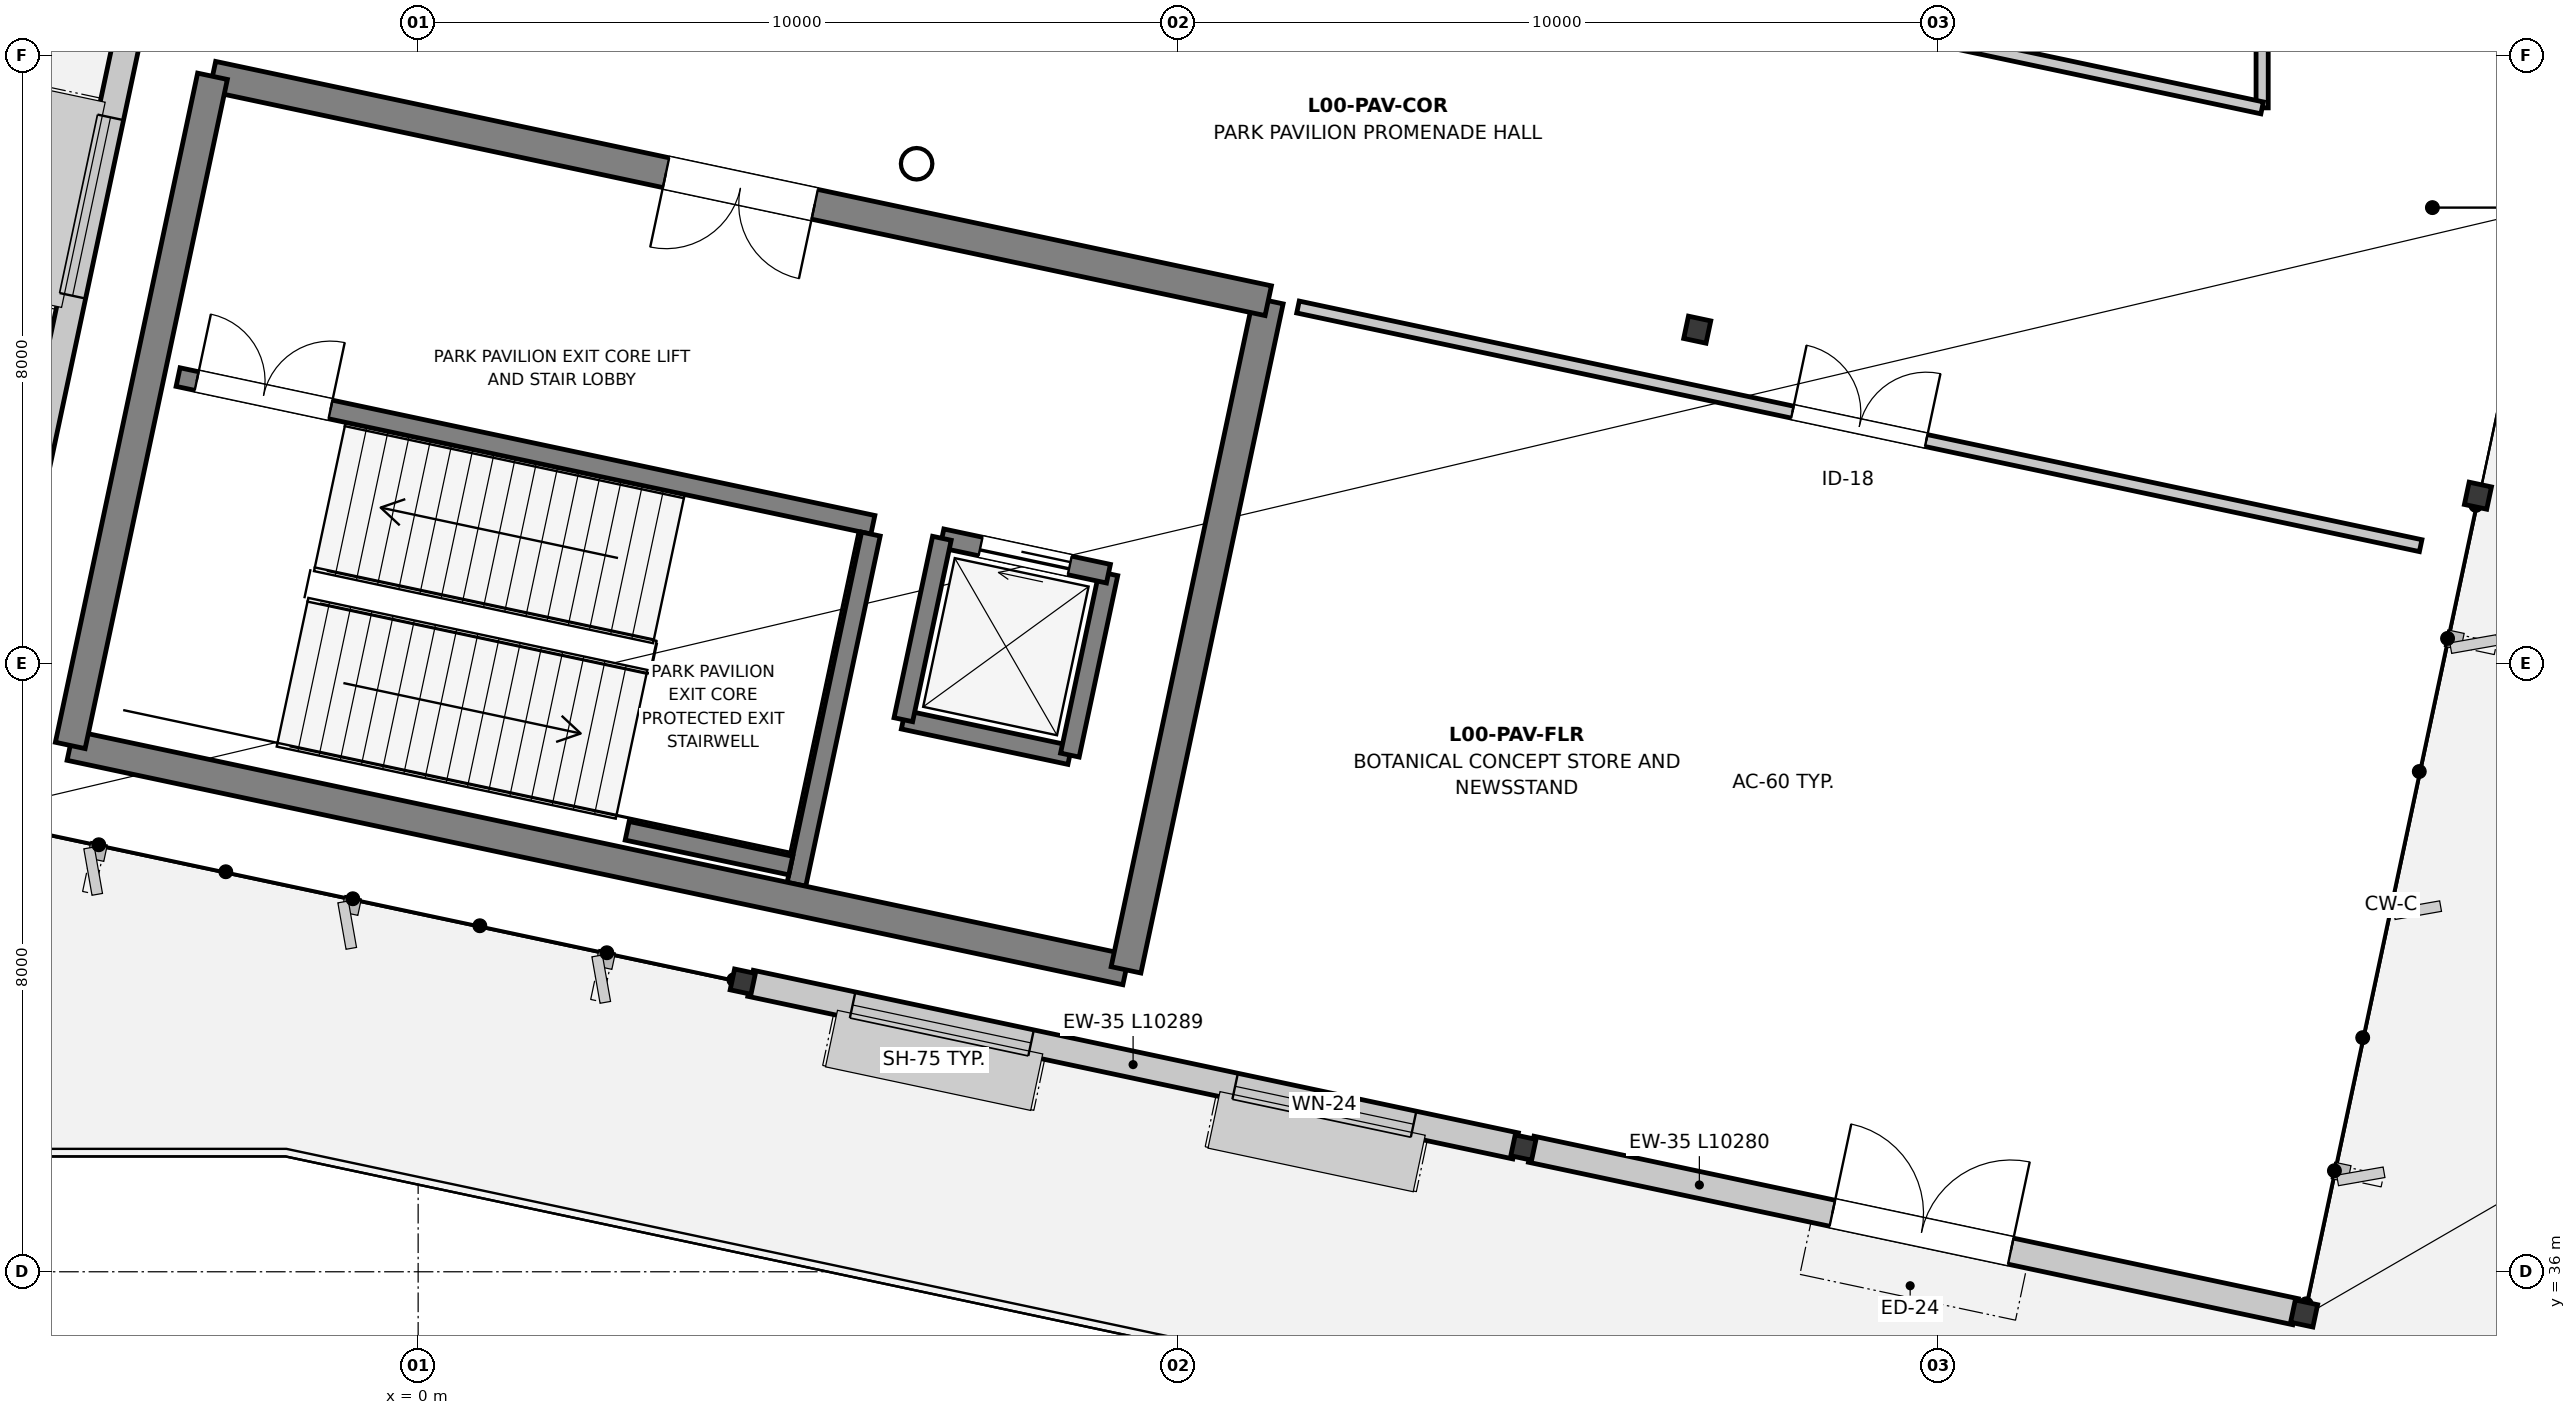
"""IFC4 building model, lengths in metres.
Left out: names, types, materials, properties, quantities, classifications, styles, units other than length and angle.
Written with IfcOpenShell. Run it as: python <this file> out.ifc"""

import sys

from ifc_helpers import new_model, si_unit, direction, frame, frame_2d, origin, origin_2d, place, context, subcontext, project, spatial, rectangle, hollow_rectangle, hollow_circle, i_section, extrude, element, fill, save


model = new_model("IFC4")
c1 = context("Model", 3, precision=1e-05, world=origin(), true_north=direction((0.0, 1.0)))
c2 = subcontext(c1, "Body", "Model", "MODEL_VIEW")
j1 = project(units=[si_unit("LENGTHUNIT", "METRE"), si_unit("PLANEANGLEUNIT", "RADIAN")], contexts=[c1])
p1 = place(None, origin())
s1 = spatial("IfcSite", under=j1, at=p1, CompositionType="ELEMENT")
p2 = place(p1, origin())
s2 = spatial("IfcBuilding", under=s1, at=p2, CompositionType="ELEMENT")
p3 = place(p2, origin())
s3 = spatial("IfcBuildingStorey", under=s2, at=p3, CompositionType="ELEMENT", Elevation=0.0)
p4 = place(p3, frame((4.271, 39.817, 0.0), z_axis=(0.0, 0.0, 1.0), x_axis=(0.978147600734, -0.207911690818, 0.0)))
e1 = element("IfcColumn", 1, at=p4, inside=s3, PredefinedType="COLUMN", context=c2, shape_type="SweptSolid", body=[
    extrude(i_section(OverallWidth=0.28, OverallDepth=0.28, WebThickness=0.011, FlangeThickness=0.018, FilletRadius=0.024, at=origin_2d()), origin(), (0.0, 0.0, 1.0), 6.0),
])
p5 = place(p3, frame((6.558, 50.577, 0.0), z_axis=(0.0, 0.0, 1.0), x_axis=(0.978147600734, -0.207911690818, 0.0)))
e2 = element("IfcColumn", 2, at=p5, inside=s3, PredefinedType="COLUMN", context=c2, shape_type="SweptSolid", body=[
    extrude(hollow_circle(Radius=0.203, WallThickness=0.016, at=origin_2d()), origin(), (0.0, 0.0, 1.0), 6.0),
])
p6 = place(p3, frame((14.541, 37.634, 0.0), z_axis=(0.0, 0.0, 1.0), x_axis=(0.978147600734, -0.207911690818, 0.0)))
e3 = element("IfcColumn", 3, at=p6, inside=s3, PredefinedType="COLUMN", context=c2, shape_type="SweptSolid", body=[
    extrude(i_section(OverallWidth=0.28, OverallDepth=0.28, WebThickness=0.011, FlangeThickness=0.018, FilletRadius=0.024, at=origin_2d()), origin(), (0.0, 0.0, 1.0), 6.0),
])
p7 = place(p3, frame((16.828, 48.394, 0.0), z_axis=(0.0, 0.0, 1.0), x_axis=(0.978147600734, -0.207911690818, 0.0)))
e4 = element("IfcColumn", 4, at=p7, inside=s3, PredefinedType="COLUMN", context=c2, shape_type="SweptSolid", body=[
    extrude(hollow_rectangle(XDim=0.3, YDim=0.3, WallThickness=0.016, InnerFilletRadius=0.016, OuterFilletRadius=0.032, at=origin_2d()), origin(), (0.0, 0.0, 1.0), 6.0),
])
for number, where, z_axis, x_axis in (
    (5, (24.812, 35.451, 0.0), (0.0, 0.0, 1.0), (0.978, -0.208, 0.0)),
    (6, (27.099, 46.21, 0.0), (0.0, 0.0, 1.0), (0.978, -0.208, 0.0)),
):
    element("IfcColumn", number, at=place(p3, frame(where, z_axis=z_axis, x_axis=x_axis)), inside=s3, PredefinedType="COLUMN", context=c2, shape_type="SweptSolid", body=[
        extrude(i_section(OverallWidth=0.3, OverallDepth=0.3, WebThickness=0.011, FlangeThickness=0.019, FilletRadius=0.027, at=origin_2d()), origin(), (0.0, 0.0, 1.0), 6.0),
    ])
p8 = place(p3, frame((4.374, 39.795, 0.0), z_axis=(0.0, 0.0, 1.0), x_axis=(0.978149513342, -0.207902692501, 0.0)))
e7 = element("IfcWall", 7, at=p8, inside=s3, PredefinedType="STANDARD", context=c2, shape_type="SweptSolid", body=[
    extrude(rectangle(XDim=10.289, YDim=0.35, at=frame_2d((5.145, 0.0))), origin(), (0.0, 0.0, 1.0), 5.015),
])
p9 = place(p8, frame((1.372, 0.0, 0.85)))
e8 = element("IfcOpeningElement", 8, at=p9, cuts=e7, PredefinedType="OPENING", context=c2, shape_type="SweptSolid", body=[
    extrude(rectangle(XDim=2.4, YDim=1.8, at=frame_2d((1.2, 0.9))), frame((0.0, 0.185, 0.0), z_axis=(0.0, -1.0, 0.0), x_axis=(1.0, 0.0, 0.0)), (0.0, 0.0, 1.0), 0.37),
])
p10 = place(p8, frame((6.517, 0.0, 0.85)))
e9 = element("IfcOpeningElement", 9, at=p10, cuts=e7, PredefinedType="OPENING", context=c2, shape_type="SweptSolid", body=[
    extrude(rectangle(XDim=2.4, YDim=1.8, at=frame_2d((1.2, 0.9))), frame((0.0, 0.185, 0.0), z_axis=(0.0, -1.0, 0.0), x_axis=(1.0, 0.0, 0.0)), (0.0, 0.0, 1.0), 0.37),
])
p11 = place(p3, frame((14.644, 37.612, 0.0), z_axis=(0.0, 0.0, 1.0), x_axis=(0.978146142238, -0.207918552381, 0.0)))
e10 = element("IfcWall", 10, at=p11, inside=s3, PredefinedType="STANDARD", context=c2, shape_type="SweptSolid", body=[
    extrude(rectangle(XDim=10.28, YDim=0.35, at=frame_2d((5.14, 0.0))), origin(), (0.0, 0.0, 1.0), 4.975),
])
p12 = place(p11, frame((4.05, 0.0, 0.0)))
e11 = element("IfcOpeningElement", 11, at=p12, cuts=e10, PredefinedType="OPENING", context=c2, shape_type="SweptSolid", body=[
    extrude(rectangle(XDim=2.4, YDim=2.5, at=frame_2d((1.2, 1.25))), frame((0.0, 0.185, 0.0), z_axis=(0.0, -1.0, 0.0), x_axis=(1.0, 0.0, 0.0)), (0.0, 0.0, 1.0), 0.37),
])
p13 = place(p3, frame((-3.737, 52.648, 0.0), z_axis=(0.0, 0.0, 1.0), x_axis=(-0.207913167485, -0.978147286857, 0.0)))
e12 = element("IfcWall", 12, at=p13, inside=s3, PredefinedType="STANDARD", context=c2, shape_type="SweptSolid", body=[
    extrude(rectangle(XDim=10.77, YDim=0.35, at=frame_2d((5.385, 0.0))), origin(), (0.0, 0.0, 1.0), 5.025),
])
p14 = place(p13, frame((1.493, 0.0, 0.85)))
e13 = element("IfcOpeningElement", 13, at=p14, cuts=e12, PredefinedType="OPENING", context=c2, shape_type="SweptSolid", body=[
    extrude(rectangle(XDim=2.4, YDim=1.8, at=frame_2d((1.2, 0.9))), frame((0.0, 0.185, 0.0), z_axis=(0.0, -1.0, 0.0), x_axis=(1.0, 0.0, 0.0)), (0.0, 0.0, 1.0), 0.37),
])
p15 = place(p13, frame((6.878, 0.0, 0.85)))
e14 = element("IfcOpeningElement", 14, at=p15, cuts=e12, PredefinedType="OPENING", context=c2, shape_type="SweptSolid", body=[
    extrude(rectangle(XDim=2.4, YDim=1.8, at=frame_2d((1.2, 0.9))), frame((0.0, 0.185, 0.0), z_axis=(0.0, -1.0, 0.0), x_axis=(1.0, 0.0, 0.0)), (0.0, 0.0, 1.0), 0.37),
])
p16 = place(p3, frame((6.383, 43.263, 0.0), z_axis=(0.0, 0.0, 1.0), x_axis=(0.978150567781, -0.207897731466, 0.0)))
e15 = element("IfcWall", 15, at=p16, inside=s3, PredefinedType="SOLIDWALL", context=c2, shape_type="SweptSolid", body=[
    extrude(rectangle(XDim=2.24, YDim=0.25, at=frame_2d((1.12, 0.0))), origin(), (0.0, 0.0, 1.0), 5.64),
])
p17 = place(p3, frame((8.574, 42.797, 0.0), z_axis=(0.0, 0.0, 1.0), x_axis=(0.207908261464, 0.978148329659, 0.0)))
e16 = element("IfcWall", 16, at=p17, inside=s3, PredefinedType="SOLIDWALL", context=c2, shape_type="SweptSolid", body=[
    extrude(rectangle(XDim=2.44, YDim=0.25, at=frame_2d((1.22, 0.0))), origin(), (0.0, 0.0, 1.0), 5.64),
])
p18 = place(p3, frame((9.082, 45.184, 0.0), z_axis=(0.0, 0.0, 1.0), x_axis=(-0.978150567781, 0.207897731466, 0.0)))
e17 = element("IfcWall", 17, at=p18, inside=s3, PredefinedType="SOLIDWALL", context=c2, shape_type="SweptSolid", body=[
    extrude(rectangle(XDim=2.24, YDim=0.25, at=frame_2d((1.12, 0.0))), origin(), (0.0, 0.0, 1.0), 5.64),
])
p19 = place(p18, frame((0.52, 0.0, 0.0)))
e18 = element("IfcOpeningElement", 18, at=p19, cuts=e17, PredefinedType="OPENING", context=c2, shape_type="SweptSolid", body=[
    extrude(rectangle(XDim=1.2, YDim=2.2, at=frame_2d((0.6, 1.1))), frame((0.0, 0.135, 0.0), z_axis=(0.0, -1.0, 0.0), x_axis=(1.0, 0.0, 0.0)), (0.0, 0.0, 1.0), 0.27),
])
p20 = place(p3, frame((6.891, 45.65, 0.0), z_axis=(0.0, 0.0, 1.0), x_axis=(-0.207908261464, -0.978148329659, 0.0)))
e19 = element("IfcWall", 19, at=p20, inside=s3, PredefinedType="SOLIDWALL", context=c2, shape_type="SweptSolid", body=[
    extrude(rectangle(XDim=2.44, YDim=0.25, at=frame_2d((1.22, 0.0))), origin(), (0.0, 0.0, 1.0), 5.64),
])
p21 = place(p3, frame((-3.158, 47.77, 0.0), z_axis=(0.0, 0.0, 1.0), x_axis=(0.978146230105, -0.207918139013, 0.0)))
e20 = element("IfcWall", 20, at=p21, inside=s3, PredefinedType="SOLIDWALL", context=c2, shape_type="SweptSolid", body=[
    extrude(rectangle(XDim=9.345, YDim=0.25, at=frame_2d((4.673, 0.0))), origin(), (0.0, 0.0, 1.0), 5.62),
])
p22 = place(p21, frame((0.25, 0.0, 0.0)))
e21 = element("IfcOpeningElement", 21, at=p22, cuts=e20, PredefinedType="OPENING", context=c2, shape_type="SweptSolid", body=[
    extrude(rectangle(XDim=1.8, YDim=2.25, at=frame_2d((0.9, 1.125))), frame((0.0, 0.135, 0.0), z_axis=(0.0, -1.0, 0.0), x_axis=(1.0, 0.0, 0.0)), (0.0, 0.0, 1.0), 0.27),
])
p23 = place(p3, frame((4.977, 41.098, 0.0), z_axis=(0.0, 0.0, 1.0), x_axis=(0.207897606308, 0.978150594383, 0.0)))
e22 = element("IfcWall", 22, at=p23, inside=s3, PredefinedType="SOLIDWALL", context=c2, shape_type="SweptSolid", body=[
    extrude(rectangle(XDim=4.71, YDim=0.25, at=frame_2d((2.355, 0.0))), origin(), (0.0, 0.0, 1.0), 5.62),
])
p24 = place(p3, frame((2.75, 41.801, 0.0), z_axis=(0.0, 0.0, 1.0), x_axis=(0.978147643724, -0.207911488563, 0.0)))
e23 = element("IfcWall", 23, at=p24, inside=s3, PredefinedType="SOLIDWALL", context=c2, shape_type="SweptSolid", body=[
    extrude(rectangle(XDim=2.2, YDim=0.25, at=frame_2d((1.1, 0.0))), origin(), (0.0, 0.0, 1.0), 5.62),
])
p25 = place(p3, frame((-4.577, 42.924, 0.0), z_axis=(0.0, 0.0, 1.0), x_axis=(0.978148272054, -0.20790853248, 0.0)))
e24 = element("IfcWall", 24, at=p25, inside=s3, PredefinedType="SHEAR", context=c2, shape_type="SweptSolid", body=[
    extrude(rectangle(XDim=14.2, YDim=0.4, at=frame_2d((7.1, 0.0))), origin(), (0.0, 0.0, 1.0), 5.64),
])
p26 = place(p3, frame((9.313, 39.972, 0.0), z_axis=(0.0, 0.0, 1.0), x_axis=(0.20791177806, 0.97814758219, 0.0)))
e25 = element("IfcWall", 25, at=p26, inside=s3, PredefinedType="SHEAR", context=c2, shape_type="SweptSolid", body=[
    extrude(rectangle(XDim=9.0, YDim=0.4, at=frame_2d((4.5, 0.0))), origin(), (0.0, 0.0, 1.0), 5.64),
])
p27 = place(p3, frame((11.184, 48.775, 0.0), z_axis=(0.0, 0.0, 1.0), x_axis=(-0.978148272054, 0.20790853248, 0.0)))
e26 = element("IfcWall", 26, at=p27, inside=s3, PredefinedType="SHEAR", context=c2, shape_type="SweptSolid", body=[
    extrude(rectangle(XDim=14.2, YDim=0.4, at=frame_2d((7.1, 0.0))), origin(), (0.0, 0.0, 1.0), 5.64),
])
p28 = place(p27, frame((6.1, 0.0, 0.0)))
e27 = element("IfcOpeningElement", 27, at=p28, cuts=e26, PredefinedType="OPENING", context=c2, shape_type="SweptSolid", body=[
    extrude(rectangle(XDim=2.0, YDim=2.3, at=frame_2d((1.0, 1.15))), frame((0.0, 0.21, 0.0), z_axis=(0.0, -1.0, 0.0), x_axis=(1.0, 0.0, 0.0)), (0.0, 0.0, 1.0), 0.42),
])
p29 = place(p3, frame((-2.705, 51.728, 0.0), z_axis=(0.0, 0.0, 1.0), x_axis=(-0.20791177806, -0.97814758219, 0.0)))
e28 = element("IfcWall", 28, at=p29, inside=s3, PredefinedType="SHEAR", context=c2, shape_type="SweptSolid", body=[
    extrude(rectangle(XDim=9.0, YDim=0.4, at=frame_2d((4.5, 0.0))), origin(), (0.0, 0.0, 1.0), 5.64),
])
p30 = place(p3, frame((24.26, 65.74, 0.0), z_axis=(0.0, 0.0, 1.0), x_axis=(0.0, -1.0, 0.0)))
e29 = element("IfcWall", 29, at=p30, inside=s3, PredefinedType="PARTITIONING", context=c2, shape_type="SweptSolid", body=[
    extrude(rectangle(XDim=14.428, YDim=0.16, at=frame_2d((7.214, 0.0))), origin(), (0.0, 0.0, 1.0), 5.075),
])
p31 = place(p30, frame((6.314, 0.0, 0.0)))
e30 = element("IfcOpeningElement", 30, at=p31, cuts=e29, PredefinedType="OPENING", context=c2, shape_type="SweptSolid", body=[
    extrude(rectangle(XDim=1.8, YDim=2.25, at=frame_2d((0.9, 1.125))), frame((0.0, 0.09, 0.0), z_axis=(0.0, -1.0, 0.0), x_axis=(1.0, 0.0, 0.0)), (0.0, 0.0, 1.0), 0.18),
])
p32 = place(p3, frame((24.26, 51.312, 0.0), z_axis=(0.0, 0.0, 1.0), x_axis=(-0.978147198247, 0.207913584359, 0.0)))
e31 = element("IfcWall", 31, at=p32, inside=s3, PredefinedType="PARTITIONING", context=c2, shape_type="SweptSolid", body=[
    extrude(rectangle(XDim=12.063, YDim=0.16, at=frame_2d((6.031, 0.0))), origin(), (0.0, 0.0, 1.0), 4.975),
])
p33 = place(p3, frame((11.575, 48.692, 0.0), z_axis=(0.0, 0.0, 1.0), x_axis=(0.978147353885, -0.207912852149, 0.0)))
e32 = element("IfcWall", 32, at=p33, inside=s3, PredefinedType="PARTITIONING", context=c2, shape_type="SweptSolid", body=[
    extrude(rectangle(XDim=15.1, YDim=0.16, at=frame_2d((7.55, 0.0))), origin(), (0.0, 0.0, 1.0), 5.015),
])
p34 = place(p33, frame((6.65, 0.0, 0.0)))
e33 = element("IfcOpeningElement", 33, at=p34, cuts=e32, PredefinedType="OPENING", context=c2, shape_type="SweptSolid", body=[
    extrude(rectangle(XDim=1.8, YDim=2.25, at=frame_2d((0.9, 1.125))), frame((0.0, 0.09, 0.0), z_axis=(0.0, -1.0, 0.0), x_axis=(1.0, 0.0, 0.0)), (0.0, 0.0, 1.0), 0.18),
])
p35 = place(p9, origin())
e34 = element("IfcWindow", 34, at=p35, inside=s3, PartitioningType="SINGLE_PANEL", PredefinedType="WINDOW", context=c2, shape_type="SweptSolid", body=[
    extrude(rectangle(XDim=2.4, YDim=1.8, at=frame_2d((1.2, 0.9))), frame((0.0, 0.03, 0.0), z_axis=(0.0, -1.0, 0.0), x_axis=(1.0, 0.0, 0.0)), (0.0, 0.0, 1.0), 0.06),
])
fill(e8, e34)
p36 = place(p10, origin())
e35 = element("IfcWindow", 35, at=p36, inside=s3, PartitioningType="SINGLE_PANEL", PredefinedType="WINDOW", context=c2, shape_type="SweptSolid", body=[
    extrude(rectangle(XDim=2.4, YDim=1.8, at=frame_2d((1.2, 0.9))), frame((0.0, 0.03, 0.0), z_axis=(0.0, -1.0, 0.0), x_axis=(1.0, 0.0, 0.0)), (0.0, 0.0, 1.0), 0.06),
])
fill(e9, e35)
p37 = place(p12, origin())
e36 = element("IfcDoor", 36, at=p37, inside=s3, OperationType="DOUBLE_DOOR_SINGLE_SWING", PredefinedType="DOOR", context=c2, shape_type="SweptSolid", body=[
    extrude(rectangle(XDim=2.4, YDim=2.5, at=frame_2d((1.2, 1.25))), frame((0.0, 0.025, 0.0), z_axis=(0.0, -1.0, 0.0), x_axis=(1.0, 0.0, 0.0)), (0.0, 0.0, 1.0), 0.05),
])
fill(e11, e36)
p38 = place(p14, origin())
e37 = element("IfcWindow", 37, at=p38, inside=s3, PartitioningType="SINGLE_PANEL", PredefinedType="WINDOW", context=c2, shape_type="SweptSolid", body=[
    extrude(rectangle(XDim=2.4, YDim=1.8, at=frame_2d((1.2, 0.9))), frame((0.0, 0.03, 0.0), z_axis=(0.0, -1.0, 0.0), x_axis=(1.0, 0.0, 0.0)), (0.0, 0.0, 1.0), 0.06),
])
fill(e13, e37)
p39 = place(p19, origin())
e38 = element("IfcDoor", 38, at=p39, inside=s3, OperationType="SLIDING_TO_RIGHT", PredefinedType="DOOR", context=c2, shape_type="SweptSolid", body=[
    extrude(rectangle(XDim=1.2, YDim=2.2, at=frame_2d((0.6, 1.1))), frame((0.0, 0.025, 0.0), z_axis=(0.0, -1.0, 0.0), x_axis=(1.0, 0.0, 0.0)), (0.0, 0.0, 1.0), 0.05),
])
fill(e18, e38)
p40 = place(p22, origin())
e39 = element("IfcDoor", 39, at=p40, inside=s3, OperationType="DOUBLE_DOOR_SINGLE_SWING", PredefinedType="DOOR", context=c2, shape_type="SweptSolid", body=[
    extrude(rectangle(XDim=1.8, YDim=2.25, at=frame_2d((0.9, 1.125))), frame((0.0, 0.025, 0.0), z_axis=(0.0, -1.0, 0.0), x_axis=(1.0, 0.0, 0.0)), (0.0, 0.0, 1.0), 0.05),
])
fill(e21, e39)
p41 = place(p28, origin())
e40 = element("IfcDoor", 40, at=p41, inside=s3, OperationType="DOUBLE_DOOR_SINGLE_SWING", PredefinedType="DOOR", context=c2, shape_type="SweptSolid", body=[
    extrude(rectangle(XDim=2.0, YDim=2.3, at=frame_2d((1.0, 1.15))), frame((0.0, 0.025, 0.0), z_axis=(0.0, -1.0, 0.0), x_axis=(1.0, 0.0, 0.0)), (0.0, 0.0, 1.0), 0.05),
])
fill(e27, e40)
p42 = place(p34, origin())
e41 = element("IfcDoor", 41, at=p42, inside=s3, OperationType="DOUBLE_DOOR_SINGLE_SWING", PredefinedType="DOOR", context=c2, shape_type="SweptSolid", body=[
    extrude(rectangle(XDim=1.8, YDim=2.25, at=frame_2d((0.9, 1.125))), frame((0.0, 0.025, 0.0), z_axis=(0.0, -1.0, 0.0), x_axis=(1.0, 0.0, 0.0)), (0.0, 0.0, 1.0), 0.05),
])
fill(e33, e41)
save(model, sys.argv[1])
